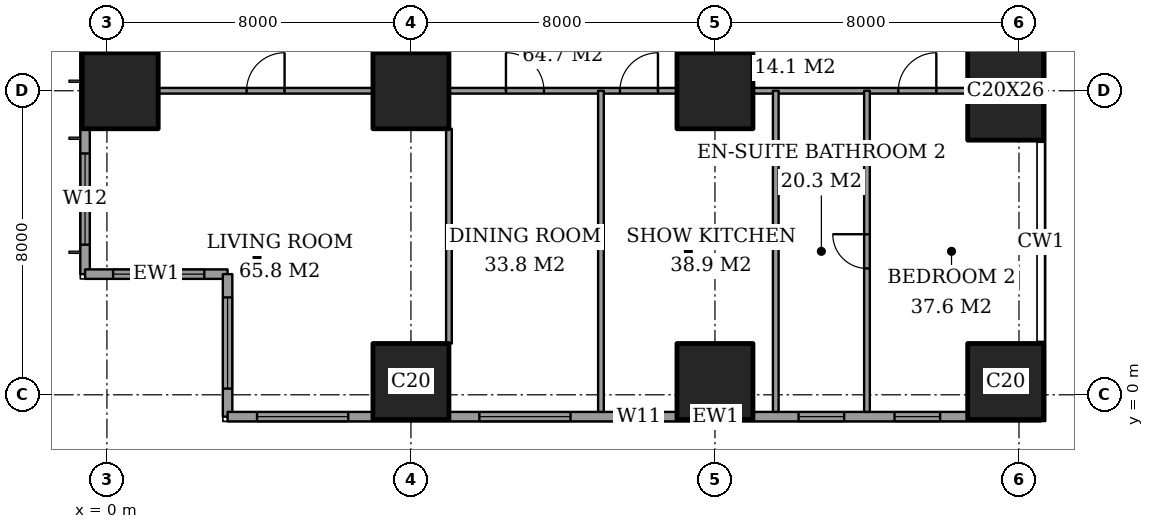
"""IFC4 building model, lengths in metres.
Left out: names, types, materials, properties, quantities, classifications, styles, units other than length and angle.
Written with IfcOpenShell. Run it as: python <this file> out.ifc"""

import sys

from ifc_helpers import new_model, si_unit, direction, frame, frame_2d, origin, origin_2d, place, context, subcontext, project, spatial, rectangle, extrude, element, fill, save


model = new_model("IFC4")
c1 = context("Model", 3, precision=1e-05, world=origin(), true_north=direction((0.0, 1.0)))
c2 = subcontext(c1, "Body", "Model", "MODEL_VIEW")
j1 = project(units=[si_unit("LENGTHUNIT", "METRE"), si_unit("PLANEANGLEUNIT", "RADIAN")], contexts=[c1])
p1 = place(None, origin())
s1 = spatial("IfcSite", under=j1, at=p1, CompositionType="ELEMENT")
p2 = place(p1, origin())
s2 = spatial("IfcBuilding", under=s1, at=p2, CompositionType="ELEMENT")
p3 = place(p2, frame((0.0, 0.0, 135.8)))
s3 = spatial("IfcBuildingStorey", under=s2, at=p3, CompositionType="ELEMENT", Elevation=135.8)
for number, where, z_axis, x_axis in (
    (1, (0.35, 8.0, 0.0), (0.0, 0.0, 1.0), (1.0, 0.0, 0.0)),
    (2, (8.0, 0.35, 0.0), (0.0, 0.0, 1.0), (1.0, 0.0, 0.0)),
    (3, (8.0, 8.0, 0.0), (0.0, 0.0, 1.0), (1.0, 0.0, 0.0)),
    (4, (16.0, 0.35, 0.0), (0.0, 0.0, 1.0), (1.0, 0.0, 0.0)),
    (5, (16.0, 8.0, 0.0), (0.0, 0.0, 1.0), (1.0, 0.0, 0.0)),
    (6, (23.65, 0.35, 0.0), (0.0, 0.0, 1.0), (1.0, 0.0, 0.0)),
):
    element("IfcColumn", number, at=place(p3, frame(where, z_axis=z_axis, x_axis=x_axis)), inside=s3, PredefinedType="COLUMN", context=c2, shape_type="SweptSolid", body=[
        extrude(rectangle(XDim=2.0, YDim=2.0, at=origin_2d()), origin(), (0.0, 0.0, 1.0), 3.6),
    ])
p4 = place(p3, frame((23.65, 8.0, 0.0), z_axis=(0.0, 0.0, 1.0), x_axis=(1.0, 0.0, 0.0)))
e7 = element("IfcColumn", 7, at=p4, inside=s3, PredefinedType="COLUMN", context=c2, shape_type="SweptSolid", body=[
    extrude(rectangle(XDim=2.0, YDim=2.6, at=origin_2d()), origin(), (0.0, 0.0, 1.0), 3.6),
])
p5 = place(p3, frame((-0.575, 44.825, 0.0), z_axis=(0.0, 0.0, 1.0), x_axis=(0.0, -1.0, 0.0)))
e8 = element("IfcWall", 8, at=p5, inside=s3, PredefinedType="SOLIDWALL", context=c2, shape_type="SweptSolid", body=[
    extrude(rectangle(XDim=41.65, YDim=0.25, at=frame_2d((20.825, 0.0))), origin(), (0.0, 0.0, 1.0), 3.6),
])
p6 = place(p5, frame((0.775, 0.0, 0.4)))
e9 = element("IfcOpeningElement", 9, at=p6, cuts=e8, PredefinedType="OPENING", context=c2, shape_type="SweptSolid", body=[
    extrude(rectangle(XDim=2.4, YDim=2.2, at=frame_2d((1.2, 1.1))), frame((0.0, 0.135, 0.0), z_axis=(0.0, -1.0, 0.0), x_axis=(1.0, 0.0, 0.0)), (0.0, 0.0, 1.0), 0.27),
])
p7 = place(p5, frame((6.1, 0.0, 0.4)))
e10 = element("IfcOpeningElement", 10, at=p7, cuts=e8, PredefinedType="OPENING", context=c2, shape_type="SweptSolid", body=[
    extrude(rectangle(XDim=1.2, YDim=2.2, at=frame_2d((0.6, 1.1))), frame((0.0, 0.135, 0.0), z_axis=(0.0, -1.0, 0.0), x_axis=(1.0, 0.0, 0.0)), (0.0, 0.0, 1.0), 0.27),
])
p8 = place(p5, frame((8.425, 0.0, 0.4)))
e11 = element("IfcOpeningElement", 11, at=p8, cuts=e8, PredefinedType="OPENING", context=c2, shape_type="SweptSolid", body=[
    extrude(rectangle(XDim=2.4, YDim=2.2, at=frame_2d((1.2, 1.1))), frame((0.0, 0.135, 0.0), z_axis=(0.0, -1.0, 0.0), x_axis=(1.0, 0.0, 0.0)), (0.0, 0.0, 1.0), 0.27),
])
p9 = place(p5, frame((15.625, 0.0, 0.4)))
e12 = element("IfcOpeningElement", 12, at=p9, cuts=e8, PredefinedType="OPENING", context=c2, shape_type="SweptSolid", body=[
    extrude(rectangle(XDim=2.4, YDim=2.2, at=frame_2d((1.2, 1.1))), frame((0.0, 0.135, 0.0), z_axis=(0.0, -1.0, 0.0), x_axis=(1.0, 0.0, 0.0)), (0.0, 0.0, 1.0), 0.27),
])
p10 = place(p5, frame((23.625, 0.0, 0.4)))
e13 = element("IfcOpeningElement", 13, at=p10, cuts=e8, PredefinedType="OPENING", context=c2, shape_type="SweptSolid", body=[
    extrude(rectangle(XDim=2.4, YDim=2.2, at=frame_2d((1.2, 1.1))), frame((0.0, 0.135, 0.0), z_axis=(0.0, -1.0, 0.0), x_axis=(1.0, 0.0, 0.0)), (0.0, 0.0, 1.0), 0.27),
])
p11 = place(p5, frame((30.825, 0.0, 0.4)))
e14 = element("IfcOpeningElement", 14, at=p11, cuts=e8, PredefinedType="OPENING", context=c2, shape_type="SweptSolid", body=[
    extrude(rectangle(XDim=2.4, YDim=2.2, at=frame_2d((1.2, 1.1))), frame((0.0, 0.135, 0.0), z_axis=(0.0, -1.0, 0.0), x_axis=(1.0, 0.0, 0.0)), (0.0, 0.0, 1.0), 0.27),
])
p12 = place(p5, frame((34.5, 0.0, 0.4)))
e15 = element("IfcOpeningElement", 15, at=p12, cuts=e8, PredefinedType="OPENING", context=c2, shape_type="SweptSolid", body=[
    extrude(rectangle(XDim=1.2, YDim=2.2, at=frame_2d((0.6, 1.1))), frame((0.0, 0.135, 0.0), z_axis=(0.0, -1.0, 0.0), x_axis=(1.0, 0.0, 0.0)), (0.0, 0.0, 1.0), 0.27),
])
p13 = place(p5, frame((38.475, 0.0, 0.4)))
e16 = element("IfcOpeningElement", 16, at=p13, cuts=e8, PredefinedType="OPENING", context=c2, shape_type="SweptSolid", body=[
    extrude(rectangle(XDim=2.4, YDim=2.2, at=frame_2d((1.2, 1.1))), frame((0.0, 0.135, 0.0), z_axis=(0.0, -1.0, 0.0), x_axis=(1.0, 0.0, 0.0)), (0.0, 0.0, 1.0), 0.27),
])
p14 = place(p3, frame((-0.575, 3.175, 0.0), z_axis=(0.0, 0.0, 1.0), x_axis=(1.0, 0.0, 0.0)))
e17 = element("IfcWall", 17, at=p14, inside=s3, PredefinedType="SOLIDWALL", context=c2, shape_type="SweptSolid", body=[
    extrude(rectangle(XDim=3.75, YDim=0.25, at=frame_2d((1.875, 0.0))), origin(), (0.0, 0.0, 1.0), 3.6),
])
p15 = place(p14, frame((0.738, 0.0, 0.4)))
e18 = element("IfcOpeningElement", 18, at=p15, cuts=e17, PredefinedType="OPENING", context=c2, shape_type="SweptSolid", body=[
    extrude(rectangle(XDim=2.4, YDim=2.2, at=frame_2d((1.2, 1.1))), frame((0.0, 0.135, 0.0), z_axis=(0.0, -1.0, 0.0), x_axis=(1.0, 0.0, 0.0)), (0.0, 0.0, 1.0), 0.27),
])
p16 = place(p3, frame((3.175, 3.175, 0.0), z_axis=(0.0, 0.0, 1.0), x_axis=(0.0, -1.0, 0.0)))
e19 = element("IfcWall", 19, at=p16, inside=s3, PredefinedType="SOLIDWALL", context=c2, shape_type="SweptSolid", body=[
    extrude(rectangle(XDim=3.75, YDim=0.25, at=frame_2d((1.875, 0.0))), origin(), (0.0, 0.0, 1.0), 3.6),
])
p17 = place(p16, frame((0.613, 0.0, 0.4)))
e20 = element("IfcOpeningElement", 20, at=p17, cuts=e19, PredefinedType="OPENING", context=c2, shape_type="SweptSolid", body=[
    extrude(rectangle(XDim=2.4, YDim=2.2, at=frame_2d((1.2, 1.1))), frame((0.0, 0.135, 0.0), z_axis=(0.0, -1.0, 0.0), x_axis=(1.0, 0.0, 0.0)), (0.0, 0.0, 1.0), 0.27),
])
p18 = place(p3, frame((3.175, -0.575, 0.0), z_axis=(0.0, 0.0, 1.0), x_axis=(1.0, 0.0, 0.0)))
e21 = element("IfcWall", 21, at=p18, inside=s3, PredefinedType="SOLIDWALL", context=c2, shape_type="SweptSolid", body=[
    extrude(rectangle(XDim=21.4, YDim=0.25, at=frame_2d((10.7, 0.0))), origin(), (0.0, 0.0, 1.0), 3.6),
])
p19 = place(p18, frame((0.775, 0.0, 0.4)))
e22 = element("IfcOpeningElement", 22, at=p19, cuts=e21, PredefinedType="OPENING", context=c2, shape_type="SweptSolid", body=[
    extrude(rectangle(XDim=2.4, YDim=2.2, at=frame_2d((1.2, 1.1))), frame((0.0, 0.135, 0.0), z_axis=(0.0, -1.0, 0.0), x_axis=(1.0, 0.0, 0.0)), (0.0, 0.0, 1.0), 0.27),
])
p20 = place(p18, frame((6.625, 0.0, 0.4)))
e23 = element("IfcOpeningElement", 23, at=p20, cuts=e21, PredefinedType="OPENING", context=c2, shape_type="SweptSolid", body=[
    extrude(rectangle(XDim=2.4, YDim=2.2, at=frame_2d((1.2, 1.1))), frame((0.0, 0.135, 0.0), z_axis=(0.0, -1.0, 0.0), x_axis=(1.0, 0.0, 0.0)), (0.0, 0.0, 1.0), 0.27),
])
p21 = place(p18, frame((10.225, 0.0, 0.4)))
e24 = element("IfcOpeningElement", 24, at=p21, cuts=e21, PredefinedType="OPENING", context=c2, shape_type="SweptSolid", body=[
    extrude(rectangle(XDim=1.2, YDim=2.2, at=frame_2d((0.6, 1.1))), frame((0.0, 0.135, 0.0), z_axis=(0.0, -1.0, 0.0), x_axis=(1.0, 0.0, 0.0)), (0.0, 0.0, 1.0), 0.27),
])
p22 = place(p18, frame((15.025, 0.0, 0.4)))
e25 = element("IfcOpeningElement", 25, at=p22, cuts=e21, PredefinedType="OPENING", context=c2, shape_type="SweptSolid", body=[
    extrude(rectangle(XDim=1.2, YDim=2.2, at=frame_2d((0.6, 1.1))), frame((0.0, 0.135, 0.0), z_axis=(0.0, -1.0, 0.0), x_axis=(1.0, 0.0, 0.0)), (0.0, 0.0, 1.0), 0.27),
])
p23 = place(p18, frame((17.55, 0.0, 0.4)))
e26 = element("IfcOpeningElement", 26, at=p23, cuts=e21, PredefinedType="OPENING", context=c2, shape_type="SweptSolid", body=[
    extrude(rectangle(XDim=1.2, YDim=2.2, at=frame_2d((0.6, 1.1))), frame((0.0, 0.135, 0.0), z_axis=(0.0, -1.0, 0.0), x_axis=(1.0, 0.0, 0.0)), (0.0, 0.0, 1.0), 0.27),
])
p24 = place(p3, frame((1.35, 8.0, 0.0), z_axis=(0.0, 0.0, 1.0), x_axis=(1.0, 0.0, 0.0)))
e27 = element("IfcWall", 27, at=p24, inside=s3, PredefinedType="PARTITIONING", context=c2, shape_type="SweptSolid", body=[
    extrude(rectangle(XDim=5.65, YDim=0.15, at=frame_2d((2.825, 0.0))), origin(), (0.0, 0.0, 1.0), 3.35),
])
p25 = place(p24, frame((2.325, 0.0, 0.0)))
e28 = element("IfcOpeningElement", 28, at=p25, cuts=e27, PredefinedType="OPENING", context=c2, shape_type="SweptSolid", body=[
    extrude(rectangle(XDim=1.0, YDim=2.1, at=frame_2d((0.5, 1.05))), frame((0.0, 0.085, 0.0), z_axis=(0.0, -1.0, 0.0), x_axis=(1.0, 0.0, 0.0)), (0.0, 0.0, 1.0), 0.17),
])
p26 = place(p3, frame((9.0, 8.0, 0.0), z_axis=(0.0, 0.0, 1.0), x_axis=(1.0, 0.0, 0.0)))
e29 = element("IfcWall", 29, at=p26, inside=s3, PredefinedType="PARTITIONING", context=c2, shape_type="SweptSolid", body=[
    extrude(rectangle(XDim=6.0, YDim=0.15, at=frame_2d((3.0, 0.0))), origin(), (0.0, 0.0, 1.0), 3.35),
])
p27 = place(p26, frame((1.5, 0.0, 0.0)))
e30 = element("IfcOpeningElement", 30, at=p27, cuts=e29, PredefinedType="OPENING", context=c2, shape_type="SweptSolid", body=[
    extrude(rectangle(XDim=1.0, YDim=2.1, at=frame_2d((0.5, 1.05))), frame((0.0, 0.085, 0.0), z_axis=(0.0, -1.0, 0.0), x_axis=(1.0, 0.0, 0.0)), (0.0, 0.0, 1.0), 0.17),
])
p28 = place(p26, frame((4.5, 0.0, 0.0)))
e31 = element("IfcOpeningElement", 31, at=p28, cuts=e29, PredefinedType="OPENING", context=c2, shape_type="SweptSolid", body=[
    extrude(rectangle(XDim=1.0, YDim=2.1, at=frame_2d((0.5, 1.05))), frame((0.0, 0.085, 0.0), z_axis=(0.0, -1.0, 0.0), x_axis=(1.0, 0.0, 0.0)), (0.0, 0.0, 1.0), 0.17),
])
p29 = place(p3, frame((17.0, 8.0, 0.0), z_axis=(0.0, 0.0, 1.0), x_axis=(1.0, 0.0, 0.0)))
e32 = element("IfcWall", 32, at=p29, inside=s3, PredefinedType="PARTITIONING", context=c2, shape_type="SweptSolid", body=[
    extrude(rectangle(XDim=5.65, YDim=0.15, at=frame_2d((2.825, 0.0))), origin(), (0.0, 0.0, 1.0), 3.35),
])
p30 = place(p29, frame((3.825, 0.0, 0.0)))
e33 = element("IfcOpeningElement", 33, at=p30, cuts=e32, PredefinedType="OPENING", context=c2, shape_type="SweptSolid", body=[
    extrude(rectangle(XDim=1.0, YDim=2.1, at=frame_2d((0.5, 1.05))), frame((0.0, 0.085, 0.0), z_axis=(0.0, -1.0, 0.0), x_axis=(1.0, 0.0, 0.0)), (0.0, 0.0, 1.0), 0.17),
])
p31 = place(p3, frame((9.0, 1.35, 0.0), z_axis=(0.0, 0.0, 1.0), x_axis=(0.0, 1.0, 0.0)))
e34 = element("IfcWall", 34, at=p31, inside=s3, PredefinedType="PARTITIONING", context=c2, shape_type="SweptSolid", body=[
    extrude(rectangle(XDim=5.65, YDim=0.15, at=frame_2d((2.825, 0.0))), origin(), (0.0, 0.0, 1.0), 3.35),
])
for number, where, z_axis, x_axis in (
    (35, (13.0, -0.45, 0.0), (0.0, 0.0, 1.0), (0.0, 1.0, 0.0)),
    (36, (17.6, -0.45, 0.0), (0.0, 0.0, 1.0), (0.0, 1.0, 0.0)),
):
    element("IfcWall", number, at=place(p3, frame(where, z_axis=z_axis, x_axis=x_axis)), inside=s3, PredefinedType="PARTITIONING", context=c2, shape_type="SweptSolid", body=[
        extrude(rectangle(XDim=8.45, YDim=0.15, at=frame_2d((4.225, 0.0))), origin(), (0.0, 0.0, 1.0), 3.35),
    ])
p32 = place(p3, frame((20.0, -0.45, 0.0), z_axis=(0.0, 0.0, 1.0), x_axis=(0.0, 1.0, 0.0)))
e37 = element("IfcWall", 37, at=p32, inside=s3, PredefinedType="PARTITIONING", context=c2, shape_type="SweptSolid", body=[
    extrude(rectangle(XDim=8.45, YDim=0.15, at=frame_2d((4.225, 0.0))), origin(), (0.0, 0.0, 1.0), 3.35),
])
p33 = place(p32, frame((3.775, 0.0, 0.0)))
e38 = element("IfcOpeningElement", 38, at=p33, cuts=e37, PredefinedType="OPENING", context=c2, shape_type="SweptSolid", body=[
    extrude(rectangle(XDim=0.9, YDim=2.1, at=frame_2d((0.45, 1.05))), frame((0.0, 0.085, 0.0), z_axis=(0.0, -1.0, 0.0), x_axis=(1.0, 0.0, 0.0)), (0.0, 0.0, 1.0), 0.17),
])
p34 = place(p13, origin())
e39 = element("IfcWindow", 39, at=p34, inside=s3, PartitioningType="SINGLE_PANEL", PredefinedType="WINDOW", context=c2, shape_type="SweptSolid", body=[
    extrude(rectangle(XDim=2.4, YDim=2.2, at=frame_2d((1.2, 1.1))), frame((0.0, 0.03, 0.0), z_axis=(0.0, -1.0, 0.0), x_axis=(1.0, 0.0, 0.0)), (0.0, 0.0, 1.0), 0.06),
])
fill(e16, e39)
p35 = place(p15, origin())
e40 = element("IfcWindow", 40, at=p35, inside=s3, PartitioningType="SINGLE_PANEL", PredefinedType="WINDOW", context=c2, shape_type="SweptSolid", body=[
    extrude(rectangle(XDim=2.4, YDim=2.2, at=frame_2d((1.2, 1.1))), frame((0.0, 0.03, 0.0), z_axis=(0.0, -1.0, 0.0), x_axis=(1.0, 0.0, 0.0)), (0.0, 0.0, 1.0), 0.06),
])
fill(e18, e40)
p36 = place(p17, origin())
e41 = element("IfcWindow", 41, at=p36, inside=s3, PartitioningType="SINGLE_PANEL", PredefinedType="WINDOW", context=c2, shape_type="SweptSolid", body=[
    extrude(rectangle(XDim=2.4, YDim=2.2, at=frame_2d((1.2, 1.1))), frame((0.0, 0.03, 0.0), z_axis=(0.0, -1.0, 0.0), x_axis=(1.0, 0.0, 0.0)), (0.0, 0.0, 1.0), 0.06),
])
fill(e20, e41)
p37 = place(p19, origin())
e42 = element("IfcWindow", 42, at=p37, inside=s3, PartitioningType="SINGLE_PANEL", PredefinedType="WINDOW", context=c2, shape_type="SweptSolid", body=[
    extrude(rectangle(XDim=2.4, YDim=2.2, at=frame_2d((1.2, 1.1))), frame((0.0, 0.03, 0.0), z_axis=(0.0, -1.0, 0.0), x_axis=(1.0, 0.0, 0.0)), (0.0, 0.0, 1.0), 0.06),
])
fill(e22, e42)
p38 = place(p20, origin())
e43 = element("IfcWindow", 43, at=p38, inside=s3, PartitioningType="SINGLE_PANEL", PredefinedType="WINDOW", context=c2, shape_type="SweptSolid", body=[
    extrude(rectangle(XDim=2.4, YDim=2.2, at=frame_2d((1.2, 1.1))), frame((0.0, 0.03, 0.0), z_axis=(0.0, -1.0, 0.0), x_axis=(1.0, 0.0, 0.0)), (0.0, 0.0, 1.0), 0.06),
])
fill(e23, e43)
p39 = place(p21, origin())
e44 = element("IfcWindow", 44, at=p39, inside=s3, PartitioningType="SINGLE_PANEL", PredefinedType="WINDOW", context=c2, shape_type="SweptSolid", body=[
    extrude(rectangle(XDim=1.2, YDim=2.2, at=frame_2d((0.6, 1.1))), frame((0.0, 0.03, 0.0), z_axis=(0.0, -1.0, 0.0), x_axis=(1.0, 0.0, 0.0)), (0.0, 0.0, 1.0), 0.06),
])
fill(e24, e44)
p40 = place(p22, origin())
e45 = element("IfcWindow", 45, at=p40, inside=s3, PartitioningType="SINGLE_PANEL", PredefinedType="WINDOW", context=c2, shape_type="SweptSolid", body=[
    extrude(rectangle(XDim=1.2, YDim=2.2, at=frame_2d((0.6, 1.1))), frame((0.0, 0.03, 0.0), z_axis=(0.0, -1.0, 0.0), x_axis=(1.0, 0.0, 0.0)), (0.0, 0.0, 1.0), 0.06),
])
fill(e25, e45)
p41 = place(p23, origin())
e46 = element("IfcWindow", 46, at=p41, inside=s3, PartitioningType="SINGLE_PANEL", PredefinedType="WINDOW", context=c2, shape_type="SweptSolid", body=[
    extrude(rectangle(XDim=1.2, YDim=2.2, at=frame_2d((0.6, 1.1))), frame((0.0, 0.03, 0.0), z_axis=(0.0, -1.0, 0.0), x_axis=(1.0, 0.0, 0.0)), (0.0, 0.0, 1.0), 0.06),
])
fill(e26, e46)
p42 = place(p25, origin())
e47 = element("IfcDoor", 47, at=p42, inside=s3, OperationType="SINGLE_SWING_LEFT", PredefinedType="DOOR", context=c2, shape_type="SweptSolid", body=[
    extrude(rectangle(XDim=1.0, YDim=2.1, at=frame_2d((0.5, 1.05))), frame((0.0, 0.025, 0.0), z_axis=(0.0, -1.0, 0.0), x_axis=(1.0, 0.0, 0.0)), (0.0, 0.0, 1.0), 0.05),
])
fill(e28, e47)
p43 = place(p27, origin())
e48 = element("IfcDoor", 48, at=p43, inside=s3, OperationType="SINGLE_SWING_RIGHT", PredefinedType="DOOR", context=c2, shape_type="SweptSolid", body=[
    extrude(rectangle(XDim=1.0, YDim=2.1, at=frame_2d((0.5, 1.05))), frame((0.0, 0.025, 0.0), z_axis=(0.0, -1.0, 0.0), x_axis=(1.0, 0.0, 0.0)), (0.0, 0.0, 1.0), 0.05),
])
fill(e30, e48)
p44 = place(p28, origin())
e49 = element("IfcDoor", 49, at=p44, inside=s3, OperationType="SINGLE_SWING_LEFT", PredefinedType="DOOR", context=c2, shape_type="SweptSolid", body=[
    extrude(rectangle(XDim=1.0, YDim=2.1, at=frame_2d((0.5, 1.05))), frame((0.0, 0.025, 0.0), z_axis=(0.0, -1.0, 0.0), x_axis=(1.0, 0.0, 0.0)), (0.0, 0.0, 1.0), 0.05),
])
fill(e31, e49)
p45 = place(p33, origin())
e50 = element("IfcDoor", 50, at=p45, inside=s3, OperationType="SINGLE_SWING_LEFT", PredefinedType="DOOR", context=c2, shape_type="SweptSolid", body=[
    extrude(rectangle(XDim=0.9, YDim=2.1, at=frame_2d((0.45, 1.05))), frame((0.0, 0.025, 0.0), z_axis=(0.0, -1.0, 0.0), x_axis=(1.0, 0.0, 0.0)), (0.0, 0.0, 1.0), 0.05),
])
fill(e38, e50)
p46 = place(p30, origin())
e51 = element("IfcDoor", 51, at=p46, inside=s3, OperationType="SINGLE_SWING_LEFT", PredefinedType="DOOR", context=c2, shape_type="SweptSolid", body=[
    extrude(rectangle(XDim=1.0, YDim=2.1, at=frame_2d((0.5, 1.05))), frame((0.0, 0.025, 0.0), z_axis=(0.0, -1.0, 0.0), x_axis=(1.0, 0.0, 0.0)), (0.0, 0.0, 1.0), 0.05),
])
fill(e33, e51)
save(model, sys.argv[1])
